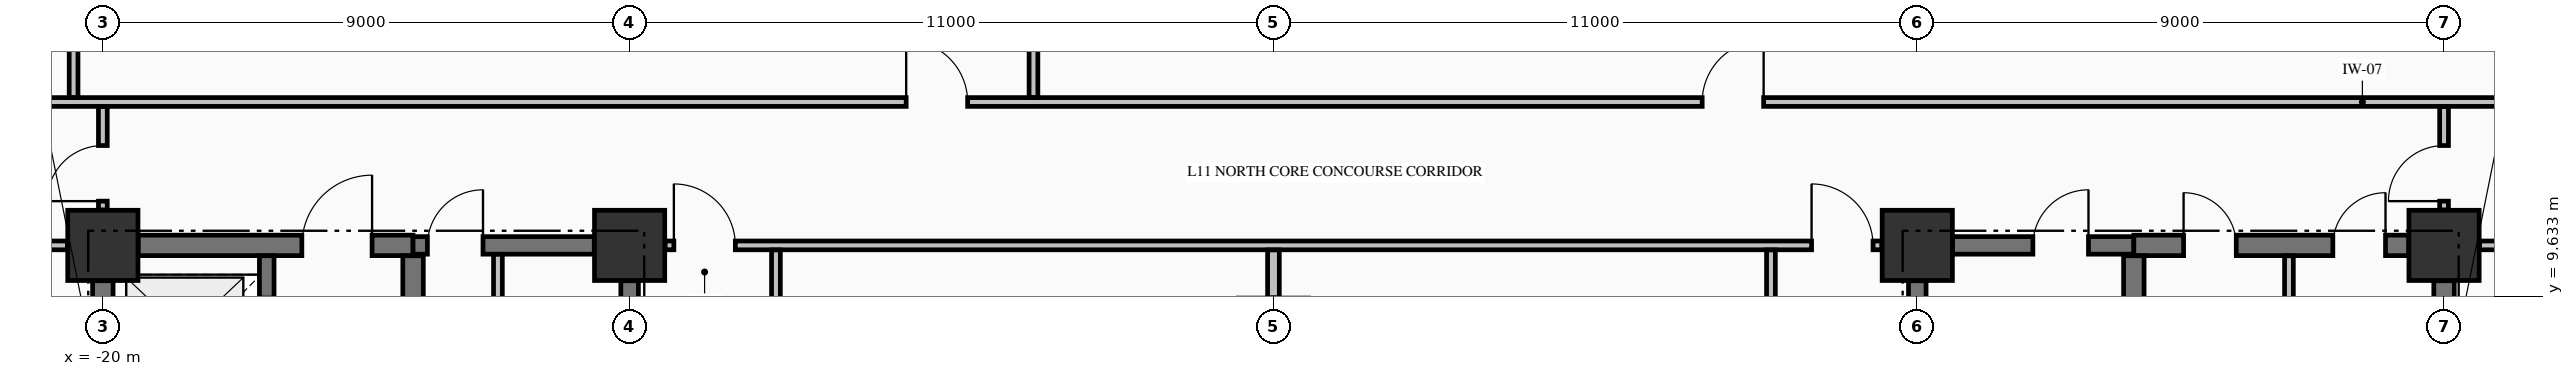
"""IFC4 building model, lengths in metres.
Left out: names, types, materials, properties, quantities, classifications, styles, units other than length and angle.
Written with IfcOpenShell. Run it as: python <this file> out.ifc"""

import sys

from ifc_helpers import new_model, si_unit, direction, frame, frame_2d, origin, origin_2d, place, context, subcontext, project, spatial, rectangle, extrude, element, fill, save


model = new_model("IFC4")
c1 = context("Model", 3, precision=1e-05, world=origin(), true_north=direction((0.0, 1.0)))
c2 = subcontext(c1, "Body", "Model", "MODEL_VIEW")
j1 = project(units=[si_unit("LENGTHUNIT", "METRE"), si_unit("PLANEANGLEUNIT", "RADIAN")], contexts=[c1])
p1 = place(None, origin())
s1 = spatial("IfcSite", under=j1, at=p1, CompositionType="ELEMENT")
p2 = place(p1, origin())
s2 = spatial("IfcBuilding", under=s1, at=p2, CompositionType="ELEMENT")
p3 = place(p2, frame((0.0, 0.0, 48.62)))
s3 = spatial("IfcBuildingStorey", under=s2, at=p3, CompositionType="ELEMENT", Elevation=48.62)
for number, where, z_axis, x_axis in (
    (1, (-20.0, 10.5, -0.25), (0.0, 0.0, 1.0), (1.0, 0.0, 0.0)),
    (2, (-11.0, 10.5, -0.25), (0.0, 0.0, 1.0), (1.0, 0.0, 0.0)),
    (3, (11.0, 10.5, -0.25), (0.0, 0.0, 1.0), (1.0, 0.0, 0.0)),
    (4, (20.0, 10.5, -0.25), (0.0, 0.0, 1.0), (1.0, 0.0, 0.0)),
):
    element("IfcColumn", number, at=place(p3, frame(where, z_axis=z_axis, x_axis=x_axis)), inside=s3, PredefinedType="COLUMN", context=c2, shape_type="SweptSolid", body=[
        extrude(rectangle(XDim=1.2, YDim=1.2, at=origin_2d()), origin(), (0.0, 0.0, 1.0), 3.395),
    ])
p4 = place(p3, frame((-19.396, 10.5, 0.0), z_axis=(0.0, 0.0, 1.0), x_axis=(1.0, 0.0, 0.0)))
e5 = element("IfcWall", 5, at=p4, inside=s3, PredefinedType="SHEAR", context=c2, shape_type="SweptSolid", body=[
    extrude(rectangle(XDim=4.696, YDim=0.35, at=frame_2d((2.348, 0.0))), origin(), (0.0, 0.0, 1.0), 3.145),
])
p5 = place(p4, frame((2.796, 0.0, 0.0)))
e6 = element("IfcOpeningElement", 6, at=p5, cuts=e5, PredefinedType="OPENING", context=c2, shape_type="SweptSolid", body=[
    extrude(rectangle(XDim=1.2, YDim=2.15, at=frame_2d((0.6, 1.075))), frame((0.0, 0.185, 0.0), z_axis=(0.0, -1.0, 0.0), x_axis=(1.0, 0.0, 0.0)), (0.0, 0.0, 1.0), 0.37),
])
p6 = place(p3, frame((-14.7, 10.5, 0.0), z_axis=(0.0, 0.0, 1.0), x_axis=(1.0, 0.0, 0.0)))
e7 = element("IfcWall", 7, at=p6, inside=s3, PredefinedType="SHEAR", context=c2, shape_type="SweptSolid", body=[
    extrude(rectangle(XDim=3.096, YDim=0.3, at=frame_2d((1.548, 0.0))), origin(), (0.0, 0.0, 1.0), 3.145),
])
p7 = place(p6, frame((0.245, 0.0, 0.0)))
e8 = element("IfcOpeningElement", 8, at=p7, cuts=e7, PredefinedType="OPENING", context=c2, shape_type="SweptSolid", body=[
    extrude(rectangle(XDim=0.95, YDim=2.15, at=frame_2d((0.475, 1.075))), frame((0.0, 0.16, 0.0), z_axis=(0.0, -1.0, 0.0), x_axis=(1.0, 0.0, 0.0)), (0.0, 0.0, 1.0), 0.32),
])
p8 = place(p3, frame((11.604, 10.5, 0.0), z_axis=(0.0, 0.0, 1.0), x_axis=(1.0, 0.0, 0.0)))
e9 = element("IfcWall", 9, at=p8, inside=s3, PredefinedType="SHEAR", context=c2, shape_type="SweptSolid", body=[
    extrude(rectangle(XDim=3.096, YDim=0.3, at=frame_2d((1.548, 0.0))), origin(), (0.0, 0.0, 1.0), 3.145),
])
p9 = place(p8, frame((1.371, 0.0, 0.0)))
e10 = element("IfcOpeningElement", 10, at=p9, cuts=e9, PredefinedType="OPENING", context=c2, shape_type="SweptSolid", body=[
    extrude(rectangle(XDim=0.95, YDim=2.15, at=frame_2d((0.475, 1.075))), frame((0.0, 0.16, 0.0), z_axis=(0.0, -1.0, 0.0), x_axis=(1.0, 0.0, 0.0)), (0.0, 0.0, 1.0), 0.32),
])
p10 = place(p3, frame((14.7, 10.5, 0.0), z_axis=(0.0, 0.0, 1.0), x_axis=(1.0, 0.0, 0.0)))
e11 = element("IfcWall", 11, at=p10, inside=s3, PredefinedType="SHEAR", context=c2, shape_type="SweptSolid", body=[
    extrude(rectangle(XDim=4.696, YDim=0.35, at=frame_2d((2.348, 0.0))), origin(), (0.0, 0.0, 1.0), 3.145),
])
p11 = place(p10, frame((0.85, 0.0, 0.0)))
e12 = element("IfcOpeningElement", 12, at=p11, cuts=e11, PredefinedType="OPENING", context=c2, shape_type="SweptSolid", body=[
    extrude(rectangle(XDim=0.9, YDim=2.15, at=frame_2d((0.45, 1.075))), frame((0.0, 0.185, 0.0), z_axis=(0.0, -1.0, 0.0), x_axis=(1.0, 0.0, 0.0)), (0.0, 0.0, 1.0), 0.37),
])
p12 = place(p10, frame((3.4, 0.0, 0.0)))
e13 = element("IfcOpeningElement", 13, at=p12, cuts=e11, PredefinedType="OPENING", context=c2, shape_type="SweptSolid", body=[
    extrude(rectangle(XDim=0.9, YDim=2.15, at=frame_2d((0.45, 1.075))), frame((0.0, 0.185, 0.0), z_axis=(0.0, -1.0, 0.0), x_axis=(1.0, 0.0, 0.0)), (0.0, 0.0, 1.0), 0.37),
])
p13 = place(p3, frame((-23.835, 10.5, 0.0), z_axis=(0.0, 0.0, 1.0), x_axis=(1.0, 0.0, 0.0)))
e14 = element("IfcWall", 14, at=p13, inside=s3, PredefinedType="PARTITIONING", context=c2, shape_type="SweptSolid", body=[
    extrude(rectangle(XDim=3.229, YDim=0.15, at=frame_2d((1.615, 0.0))), origin(), (0.0, 0.0, 1.0), 3.145),
])
p14 = place(p13, frame((1.36, 0.0, 0.0)))
e15 = element("IfcOpeningElement", 15, at=p14, cuts=e14, PredefinedType="OPENING", context=c2, shape_type="SweptSolid", body=[
    extrude(rectangle(XDim=0.95, YDim=2.15, at=frame_2d((0.475, 1.075))), frame((0.0, 0.085, 0.0), z_axis=(0.0, -1.0, 0.0), x_axis=(1.0, 0.0, 0.0)), (0.0, 0.0, 1.0), 0.17),
])
p15 = place(p3, frame((-10.394, 10.5, 0.0), z_axis=(0.0, 0.0, 1.0), x_axis=(1.0, 0.0, 0.0)))
e16 = element("IfcWall", 16, at=p15, inside=s3, PredefinedType="PARTITIONING", context=c2, shape_type="SweptSolid", body=[
    extrude(rectangle(XDim=20.788, YDim=0.15, at=frame_2d((10.394, 0.0))), origin(), (0.0, 0.0, 1.0), 3.145),
])
p16 = place(p15, frame((0.15, 0.0, 0.0)))
e17 = element("IfcOpeningElement", 17, at=p16, cuts=e16, PredefinedType="OPENING", context=c2, shape_type="SweptSolid", body=[
    extrude(rectangle(XDim=1.05, YDim=2.15, at=frame_2d((0.525, 1.075))), frame((0.0, 0.085, 0.0), z_axis=(0.0, -1.0, 0.0), x_axis=(1.0, 0.0, 0.0)), (0.0, 0.0, 1.0), 0.17),
])
p17 = place(p15, frame((19.588, 0.0, 0.0)))
e18 = element("IfcOpeningElement", 18, at=p17, cuts=e16, PredefinedType="OPENING", context=c2, shape_type="SweptSolid", body=[
    extrude(rectangle(XDim=1.05, YDim=2.15, at=frame_2d((0.525, 1.075))), frame((0.0, 0.085, 0.0), z_axis=(0.0, -1.0, 0.0), x_axis=(1.0, 0.0, 0.0)), (0.0, 0.0, 1.0), 0.17),
])
p18 = place(p3, frame((20.606, 10.5, 0.0), z_axis=(0.0, 0.0, 1.0), x_axis=(1.0, 0.0, 0.0)))
e19 = element("IfcWall", 19, at=p18, inside=s3, PredefinedType="PARTITIONING", context=c2, shape_type="SweptSolid", body=[
    extrude(rectangle(XDim=8.229, YDim=0.15, at=frame_2d((4.115, 0.0))), origin(), (0.0, 0.0, 1.0), 3.145),
])
p19 = place(p18, frame((3.394, 0.0, 0.0)))
e20 = element("IfcOpeningElement", 20, at=p19, cuts=e19, PredefinedType="OPENING", context=c2, shape_type="SweptSolid", body=[
    extrude(rectangle(XDim=1.0, YDim=2.15, at=frame_2d((0.5, 1.075))), frame((0.0, 0.085, 0.0), z_axis=(0.0, -1.0, 0.0), x_axis=(1.0, 0.0, 0.0)), (0.0, 0.0, 1.0), 0.17),
])
p20 = place(p3, frame((-23.835, 12.95, 0.0), z_axis=(0.0, 0.0, 1.0), x_axis=(1.0, 0.0, 0.0)))
e21 = element("IfcWall", 21, at=p20, inside=s3, PredefinedType="PARTITIONING", context=c2, shape_type="SweptSolid", body=[
    extrude(rectangle(XDim=52.67, YDim=0.15, at=frame_2d((26.335, 0.0))), origin(), (0.0, 0.0, 1.0), 3.145),
])
p21 = place(p20, frame((17.56, 0.0, 0.0)))
e22 = element("IfcOpeningElement", 22, at=p21, cuts=e21, PredefinedType="OPENING", context=c2, shape_type="SweptSolid", body=[
    extrude(rectangle(XDim=1.05, YDim=2.15, at=frame_2d((0.525, 1.075))), frame((0.0, 0.085, 0.0), z_axis=(0.0, -1.0, 0.0), x_axis=(1.0, 0.0, 0.0)), (0.0, 0.0, 1.0), 0.17),
])
p22 = place(p20, frame((31.16, 0.0, 0.0)))
e23 = element("IfcOpeningElement", 23, at=p22, cuts=e21, PredefinedType="OPENING", context=c2, shape_type="SweptSolid", body=[
    extrude(rectangle(XDim=1.05, YDim=2.15, at=frame_2d((0.525, 1.075))), frame((0.0, 0.085, 0.0), z_axis=(0.0, -1.0, 0.0), x_axis=(1.0, 0.0, 0.0)), (0.0, 0.0, 1.0), 0.17),
])
p23 = place(p3, frame((-20.0, 7.727, 0.0), z_axis=(0.0, 0.0, 1.0), x_axis=(0.0, 1.0, 0.0)))
e24 = element("IfcWall", 24, at=p23, inside=s3, PredefinedType="SHEAR", context=c2, shape_type="SweptSolid", body=[
    extrude(rectangle(XDim=2.169, YDim=0.35, at=frame_2d((1.084, 0.0))), origin(), (0.0, 0.0, 1.0), 3.145),
])
p24 = place(p3, frame((-17.2, 7.727, 0.0), z_axis=(0.0, 0.0, 1.0), x_axis=(0.0, 1.0, 0.0)))
e25 = element("IfcWall", 25, at=p24, inside=s3, PredefinedType="SOLIDWALL", context=c2, shape_type="SweptSolid", body=[
    extrude(rectangle(XDim=2.596, YDim=0.25, at=frame_2d((1.298, 0.0))), origin(), (0.0, 0.0, 1.0), 3.145),
])
p25 = place(p24, frame((0.773, 0.0, 0.0)))
e26 = element("IfcOpeningElement", 26, at=p25, cuts=e25, PredefinedType="OPENING", context=c2, shape_type="SweptSolid", body=[
    extrude(rectangle(XDim=1.1, YDim=2.2, at=frame_2d((0.55, 1.1))), frame((0.0, 0.135, 0.0), z_axis=(0.0, -1.0, 0.0), x_axis=(1.0, 0.0, 0.0)), (0.0, 0.0, 1.0), 0.27),
])
p26 = place(p3, frame((-14.7, 5.852, 0.0), z_axis=(0.0, 0.0, 1.0), x_axis=(0.0, 1.0, 0.0)))
e27 = element("IfcWall", 27, at=p26, inside=s3, PredefinedType="SHEAR", context=c2, shape_type="SweptSolid", body=[
    extrude(rectangle(XDim=4.471, YDim=0.35, at=frame_2d((2.235, 0.0))), origin(), (0.0, 0.0, 1.0), 3.145),
])
for number, where, z_axis, x_axis in (
    (28, (-11.0, 5.852, 0.0), (0.0, 0.0, 1.0), (0.0, 1.0, 0.0)),
    (29, (11.0, 5.852, 0.0), (0.0, 0.0, 1.0), (0.0, 1.0, 0.0)),
):
    element("IfcWall", number, at=place(p3, frame(where, z_axis=z_axis, x_axis=x_axis)), inside=s3, PredefinedType="SHEAR", context=c2, shape_type="SweptSolid", body=[
        extrude(rectangle(XDim=4.044, YDim=0.3, at=frame_2d((2.022, 0.0))), origin(), (0.0, 0.0, 1.0), 3.145),
    ])
p27 = place(p3, frame((14.7, 5.852, 0.0), z_axis=(0.0, 0.0, 1.0), x_axis=(0.0, 1.0, 0.0)))
e30 = element("IfcWall", 30, at=p27, inside=s3, PredefinedType="SHEAR", context=c2, shape_type="SweptSolid", body=[
    extrude(rectangle(XDim=4.471, YDim=0.35, at=frame_2d((2.235, 0.0))), origin(), (0.0, 0.0, 1.0), 3.145),
])
p28 = place(p3, frame((20.0, 0.604, 0.0), z_axis=(0.0, 0.0, 1.0), x_axis=(0.0, 1.0, 0.0)))
e31 = element("IfcWall", 31, at=p28, inside=s3, PredefinedType="SHEAR", context=c2, shape_type="SweptSolid", body=[
    extrude(rectangle(XDim=9.292, YDim=0.35, at=frame_2d((4.646, 0.0))), origin(), (0.0, 0.0, 1.0), 3.145),
])
p29 = place(p3, frame((-20.5, 13.028, 0.0), z_axis=(0.0, 0.0, 1.0), x_axis=(0.0, 1.0, 0.0)))
e32 = element("IfcWall", 32, at=p29, inside=s3, PredefinedType="PARTITIONING", context=c2, shape_type="SweptSolid", body=[
    extrude(rectangle(XDim=9.266, YDim=0.15, at=frame_2d((4.633, 0.0))), origin(), (0.0, 0.0, 1.0), 3.145),
])
p30 = place(p3, frame((-20.0, 11.106, 0.0), z_axis=(0.0, 0.0, 1.0), x_axis=(0.0, 1.0, 0.0)))
e33 = element("IfcWall", 33, at=p30, inside=s3, PredefinedType="PARTITIONING", context=c2, shape_type="SweptSolid", body=[
    extrude(rectangle(XDim=1.766, YDim=0.15, at=frame_2d((0.883, 0.0))), origin(), (0.0, 0.0, 1.0), 3.145),
])
p31 = place(p30, frame((0.15, 0.0, 0.0)))
e34 = element("IfcOpeningElement", 34, at=p31, cuts=e33, PredefinedType="OPENING", context=c2, shape_type="SweptSolid", body=[
    extrude(rectangle(XDim=0.95, YDim=2.15, at=frame_2d((0.475, 1.075))), frame((0.0, 0.085, 0.0), z_axis=(0.0, -1.0, 0.0), x_axis=(1.0, 0.0, 0.0)), (0.0, 0.0, 1.0), 0.17),
])
p32 = place(p3, frame((-13.25, 5.853, 0.0), z_axis=(0.0, 0.0, 1.0), x_axis=(0.0, 1.0, 0.0)))
e35 = element("IfcWall", 35, at=p32, inside=s3, PredefinedType="PARTITIONING", context=c2, shape_type="SweptSolid", body=[
    extrude(rectangle(XDim=4.494, YDim=0.15, at=frame_2d((2.247, 0.0))), origin(), (0.0, 0.0, 1.0), 3.145),
])
p33 = place(p32, frame((1.472, 0.0, 0.0)))
e36 = element("IfcOpeningElement", 36, at=p33, cuts=e35, PredefinedType="OPENING", context=c2, shape_type="SweptSolid", body=[
    extrude(rectangle(XDim=0.95, YDim=2.15, at=frame_2d((0.475, 1.075))), frame((0.0, 0.085, 0.0), z_axis=(0.0, -1.0, 0.0), x_axis=(1.0, 0.0, 0.0)), (0.0, 0.0, 1.0), 0.17),
])
p34 = place(p3, frame((-8.5, 3.703, 0.0), z_axis=(0.0, 0.0, 1.0), x_axis=(0.0, 1.0, 0.0)))
e37 = element("IfcWall", 37, at=p34, inside=s3, PredefinedType="PARTITIONING", context=c2, shape_type="SweptSolid", body=[
    extrude(rectangle(XDim=6.719, YDim=0.15, at=frame_2d((3.36, 0.0))), origin(), (0.0, 0.0, 1.0), 3.145),
])
p35 = place(p34, frame((2.822, 0.0, 0.0)))
e38 = element("IfcOpeningElement", 38, at=p35, cuts=e37, PredefinedType="OPENING", context=c2, shape_type="SweptSolid", body=[
    extrude(rectangle(XDim=1.05, YDim=2.15, at=frame_2d((0.525, 1.075))), frame((0.0, 0.085, 0.0), z_axis=(0.0, -1.0, 0.0), x_axis=(1.0, 0.0, 0.0)), (0.0, 0.0, 1.0), 0.17),
])
p36 = place(p3, frame((-4.1, 13.028, 0.0), z_axis=(0.0, 0.0, 1.0), x_axis=(0.0, 1.0, 0.0)))
e39 = element("IfcWall", 39, at=p36, inside=s3, PredefinedType="PARTITIONING", context=c2, shape_type="SweptSolid", body=[
    extrude(rectangle(XDim=13.307, YDim=0.15, at=frame_2d((6.653, 0.0))), origin(), (0.0, 0.0, 1.0), 3.145),
])
p37 = place(p3, frame((0.0, 9.606, 0.0), z_axis=(0.0, 0.0, 1.0), x_axis=(0.0, 1.0, 0.0)))
e40 = element("IfcWall", 40, at=p37, inside=s3, PredefinedType="PARTITIONING", context=c2, shape_type="SweptSolid", body=[
    extrude(rectangle(XDim=0.816, YDim=0.2, at=frame_2d((0.408, 0.0))), origin(), (0.0, 0.0, 1.0), 2.485),
])
p38 = place(p3, frame((8.5, -1.097, 0.0), z_axis=(0.0, 0.0, 1.0), x_axis=(0.0, 1.0, 0.0)))
e41 = element("IfcWall", 41, at=p38, inside=s3, PredefinedType="PARTITIONING", context=c2, shape_type="SweptSolid", body=[
    extrude(rectangle(XDim=11.519, YDim=0.15, at=frame_2d((5.76, 0.0))), origin(), (0.0, 0.0, 1.0), 3.145),
])
p39 = place(p38, frame((5.197, 0.0, 0.0)))
e42 = element("IfcOpeningElement", 42, at=p39, cuts=e41, PredefinedType="OPENING", context=c2, shape_type="SweptSolid", body=[
    extrude(rectangle(XDim=1.1, YDim=2.15, at=frame_2d((0.55, 1.075))), frame((0.0, 0.085, 0.0), z_axis=(0.0, -1.0, 0.0), x_axis=(1.0, 0.0, 0.0)), (0.0, 0.0, 1.0), 0.17),
])
p40 = place(p3, frame((17.35, -4.422, 0.0), z_axis=(0.0, 0.0, 1.0), x_axis=(0.0, 1.0, 0.0)))
e43 = element("IfcWall", 43, at=p40, inside=s3, PredefinedType="PARTITIONING", context=c2, shape_type="SweptSolid", body=[
    extrude(rectangle(XDim=14.744, YDim=0.15, at=frame_2d((7.372, 0.0))), origin(), (0.0, 0.0, 1.0), 3.145),
])
p41 = place(p3, frame((20.0, 11.106, 0.0), z_axis=(0.0, 0.0, 1.0), x_axis=(0.0, 1.0, 0.0)))
e44 = element("IfcWall", 44, at=p41, inside=s3, PredefinedType="PARTITIONING", context=c2, shape_type="SweptSolid", body=[
    extrude(rectangle(XDim=1.766, YDim=0.15, at=frame_2d((0.883, 0.0))), origin(), (0.0, 0.0, 1.0), 2.485),
])
p42 = place(p41, frame((0.15, 0.0, 0.0)))
e45 = element("IfcOpeningElement", 45, at=p42, cuts=e44, PredefinedType="OPENING", context=c2, shape_type="SweptSolid", body=[
    extrude(rectangle(XDim=0.95, YDim=2.15, at=frame_2d((0.475, 1.075))), frame((0.0, 0.085, 0.0), z_axis=(0.0, -1.0, 0.0), x_axis=(1.0, 0.0, 0.0)), (0.0, 0.0, 1.0), 0.17),
])
p43 = place(p7, origin())
e46 = element("IfcDoor", 46, at=p43, inside=s3, OperationType="SINGLE_SWING_RIGHT", PredefinedType="DOOR", context=c2, shape_type="SweptSolid", body=[
    extrude(rectangle(XDim=0.95, YDim=2.15, at=frame_2d((0.475, 1.075))), frame((0.0, 0.025, 0.0), z_axis=(0.0, -1.0, 0.0), x_axis=(1.0, 0.0, 0.0)), (0.0, 0.0, 1.0), 0.05),
])
fill(e8, e46)
p44 = place(p9, origin())
e47 = element("IfcDoor", 47, at=p44, inside=s3, OperationType="SINGLE_SWING_RIGHT", PredefinedType="DOOR", context=c2, shape_type="SweptSolid", body=[
    extrude(rectangle(XDim=0.95, YDim=2.15, at=frame_2d((0.475, 1.075))), frame((0.0, 0.025, 0.0), z_axis=(0.0, -1.0, 0.0), x_axis=(1.0, 0.0, 0.0)), (0.0, 0.0, 1.0), 0.05),
])
fill(e10, e47)
p45 = place(p5, origin())
e48 = element("IfcDoor", 48, at=p45, inside=s3, OperationType="SINGLE_SWING_RIGHT", PredefinedType="DOOR", context=c2, shape_type="SweptSolid", body=[
    extrude(rectangle(XDim=1.2, YDim=2.15, at=frame_2d((0.6, 1.075))), frame((0.0, 0.025, 0.0), z_axis=(0.0, -1.0, 0.0), x_axis=(1.0, 0.0, 0.0)), (0.0, 0.0, 1.0), 0.05),
])
fill(e6, e48)
p46 = place(p11, origin())
e49 = element("IfcDoor", 49, at=p46, inside=s3, OperationType="SINGLE_SWING_LEFT", PredefinedType="DOOR", context=c2, shape_type="SweptSolid", body=[
    extrude(rectangle(XDim=0.9, YDim=2.15, at=frame_2d((0.45, 1.075))), frame((0.0, 0.025, 0.0), z_axis=(0.0, -1.0, 0.0), x_axis=(1.0, 0.0, 0.0)), (0.0, 0.0, 1.0), 0.05),
])
fill(e12, e49)
p47 = place(p12, origin())
e50 = element("IfcDoor", 50, at=p47, inside=s3, OperationType="SINGLE_SWING_RIGHT", PredefinedType="DOOR", context=c2, shape_type="SweptSolid", body=[
    extrude(rectangle(XDim=0.9, YDim=2.15, at=frame_2d((0.45, 1.075))), frame((0.0, 0.025, 0.0), z_axis=(0.0, -1.0, 0.0), x_axis=(1.0, 0.0, 0.0)), (0.0, 0.0, 1.0), 0.05),
])
fill(e13, e50)
p48 = place(p16, origin())
e51 = element("IfcDoor", 51, at=p48, inside=s3, OperationType="SINGLE_SWING_LEFT", PredefinedType="DOOR", context=c2, shape_type="SweptSolid", body=[
    extrude(rectangle(XDim=1.05, YDim=2.15, at=frame_2d((0.525, 1.075))), frame((0.0, 0.025, 0.0), z_axis=(0.0, -1.0, 0.0), x_axis=(1.0, 0.0, 0.0)), (0.0, 0.0, 1.0), 0.05),
])
fill(e17, e51)
p49 = place(p17, origin())
e52 = element("IfcDoor", 52, at=p49, inside=s3, OperationType="SINGLE_SWING_LEFT", PredefinedType="DOOR", context=c2, shape_type="SweptSolid", body=[
    extrude(rectangle(XDim=1.05, YDim=2.15, at=frame_2d((0.525, 1.075))), frame((0.0, 0.025, 0.0), z_axis=(0.0, -1.0, 0.0), x_axis=(1.0, 0.0, 0.0)), (0.0, 0.0, 1.0), 0.05),
])
fill(e18, e52)
p50 = place(p21, origin())
e53 = element("IfcDoor", 53, at=p50, inside=s3, OperationType="SINGLE_SWING_LEFT", PredefinedType="DOOR", context=c2, shape_type="SweptSolid", body=[
    extrude(rectangle(XDim=1.05, YDim=2.15, at=frame_2d((0.525, 1.075))), frame((0.0, 0.025, 0.0), z_axis=(0.0, -1.0, 0.0), x_axis=(1.0, 0.0, 0.0)), (0.0, 0.0, 1.0), 0.05),
])
fill(e22, e53)
p51 = place(p22, origin())
e54 = element("IfcDoor", 54, at=p51, inside=s3, OperationType="SINGLE_SWING_RIGHT", PredefinedType="DOOR", context=c2, shape_type="SweptSolid", body=[
    extrude(rectangle(XDim=1.05, YDim=2.15, at=frame_2d((0.525, 1.075))), frame((0.0, 0.025, 0.0), z_axis=(0.0, -1.0, 0.0), x_axis=(1.0, 0.0, 0.0)), (0.0, 0.0, 1.0), 0.05),
])
fill(e23, e54)
p52 = place(p31, origin())
e55 = element("IfcDoor", 55, at=p52, inside=s3, OperationType="SINGLE_SWING_LEFT", PredefinedType="DOOR", context=c2, shape_type="SweptSolid", body=[
    extrude(rectangle(XDim=0.95, YDim=2.15, at=frame_2d((0.475, 1.075))), frame((0.0, 0.025, 0.0), z_axis=(0.0, -1.0, 0.0), x_axis=(1.0, 0.0, 0.0)), (0.0, 0.0, 1.0), 0.05),
])
fill(e34, e55)
p53 = place(p42, origin())
e56 = element("IfcDoor", 56, at=p53, inside=s3, OperationType="SINGLE_SWING_LEFT", PredefinedType="DOOR", context=c2, shape_type="SweptSolid", body=[
    extrude(rectangle(XDim=0.95, YDim=2.15, at=frame_2d((0.475, 1.075))), frame((0.0, 0.025, 0.0), z_axis=(0.0, -1.0, 0.0), x_axis=(1.0, 0.0, 0.0)), (0.0, 0.0, 1.0), 0.05),
])
fill(e45, e56)
save(model, sys.argv[1])
